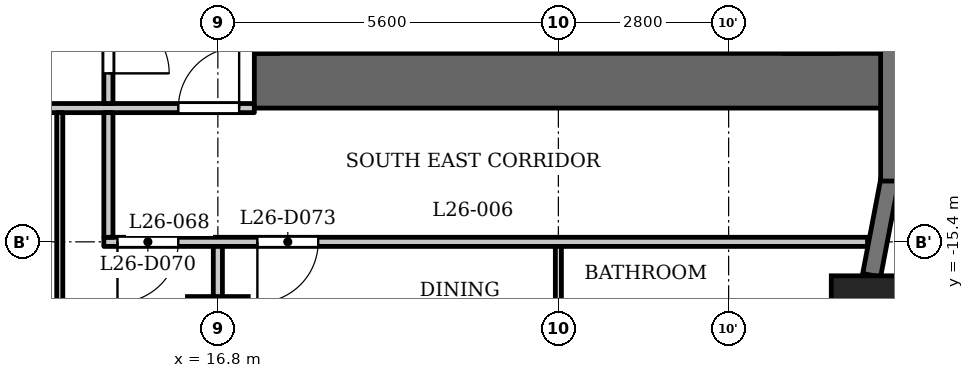
"""IFC4 building model, lengths in metres.
Left out: names, types, materials, properties, quantities, classifications, styles, units other than length and angle.
Written with IfcOpenShell. Run it as: python <this file> out.ifc"""

import sys

from ifc_helpers import new_model, si_unit, direction, frame, frame_2d, origin, origin_2d, place, context, subcontext, project, spatial, rectangle, extrude, element, fill, save


model = new_model("IFC4")
c1 = context("Model", 3, precision=1e-05, world=origin(), true_north=direction((0.0, 1.0)))
c2 = subcontext(c1, "Body", "Model", "MODEL_VIEW")
j1 = project(units=[si_unit("LENGTHUNIT", "METRE"), si_unit("PLANEANGLEUNIT", "RADIAN")], contexts=[c1])
p1 = place(None, origin())
s1 = spatial("IfcSite", under=j1, at=p1, CompositionType="ELEMENT")
p2 = place(p1, origin())
s2 = spatial("IfcBuilding", under=s1, at=p2, CompositionType="ELEMENT")
p3 = place(p2, frame((0.0, 0.0, 104.3)))
s3 = spatial("IfcBuildingStorey", under=s2, at=p3, CompositionType="ELEMENT", Elevation=104.3)
p4 = place(p3, frame((27.538, -16.609, 0.0), z_axis=(0.0, 0.0, 1.0), x_axis=(1.0, 0.0, 0.0)))
e1 = element("IfcColumn", 1, at=p4, inside=s3, PredefinedType="COLUMN", context=c2, shape_type="SweptSolid", body=[
    extrude(rectangle(XDim=1.3, YDim=1.3, at=origin_2d()), origin(), (0.0, 0.0, 1.0), 3.5),
])
p5 = place(p3, frame((16.8, -16.8, 0.0), z_axis=(0.0, 0.0, 1.0), x_axis=(1.0, 0.0, 0.0)))
e2 = element("IfcColumn", 2, at=p5, inside=s3, PredefinedType="COLUMN", context=c2, shape_type="SweptSolid", body=[
    extrude(rectangle(XDim=1.0, YDim=1.0, at=origin_2d()), origin(), (0.0, 0.0, 1.0), 3.5),
])
p6 = place(p3, frame((27.552, -15.949, 0.0), z_axis=(0.0, 0.0, 1.0), x_axis=(0.187279751651, 0.982306619453, 0.0)))
e3 = element("IfcWall", 3, at=p6, inside=s3, PredefinedType="SOLIDWALL", context=c2, shape_type="SweptSolid", body=[
    extrude(rectangle(XDim=1.606, YDim=0.3, at=frame_2d((0.803, 0.0))), origin(), (0.0, 0.0, 1.0), 2.4),
])
p7 = place(p3, frame((27.85, -14.4, 0.0), z_axis=(0.0, 0.0, 1.0), x_axis=(0.0, 1.0, 0.0)))
e4 = element("IfcWall", 4, at=p7, inside=s3, PredefinedType="SOLIDWALL", context=c2, shape_type="SweptSolid", body=[
    extrude(rectangle(XDim=2.55, YDim=0.3, at=frame_2d((1.275, 0.0))), origin(), (0.0, 0.0, 1.0), 2.4),
])
p8 = place(p3, frame((17.4, -12.75, 0.0), z_axis=(0.0, 0.0, 1.0), x_axis=(1.0, 0.0, 0.0)))
e5 = element("IfcWall", 5, at=p8, inside=s3, PredefinedType="SHEAR", context=c2, shape_type="SweptSolid", body=[
    extrude(rectangle(XDim=10.4, YDim=0.9, at=frame_2d((5.2, 0.0))), origin(), (0.0, 0.0, 1.0), 3.2),
])
p9 = place(p3, frame((17.6, -12.3, 0.0), z_axis=(0.0, 0.0, 1.0), x_axis=(0.0, 1.0, 0.0)))
e6 = element("IfcWall", 6, at=p9, inside=s3, PredefinedType="SHEAR", context=c2, shape_type="SweptSolid", body=[
    extrude(rectangle(XDim=24.6, YDim=0.4, at=frame_2d((12.3, 0.0))), origin(), (0.0, 0.0, 1.0), 3.2),
])
p10 = place(p9, frame((6.0, 0.0, 0.0)))
e7 = element("IfcOpeningElement", 7, at=p10, cuts=e6, PredefinedType="OPENING", context=c2, shape_type="SweptSolid", body=[
    extrude(rectangle(XDim=1.1, YDim=2.1, at=frame_2d((0.55, 1.05))), frame((0.0, 0.21, 0.0), z_axis=(0.0, -1.0, 0.0), x_axis=(1.0, 0.0, 0.0)), (0.0, 0.0, 1.0), 0.42),
])
p11 = place(p9, frame((8.4, 0.0, 0.0)))
e8 = element("IfcOpeningElement", 8, at=p11, cuts=e6, PredefinedType="OPENING", context=c2, shape_type="SweptSolid", body=[
    extrude(rectangle(XDim=1.1, YDim=2.1, at=frame_2d((0.55, 1.05))), frame((0.0, 0.21, 0.0), z_axis=(0.0, -1.0, 0.0), x_axis=(1.0, 0.0, 0.0)), (0.0, 0.0, 1.0), 0.42),
])
p12 = place(p9, frame((10.8, 0.0, 0.0)))
e9 = element("IfcOpeningElement", 9, at=p12, cuts=e6, PredefinedType="OPENING", context=c2, shape_type="SweptSolid", body=[
    extrude(rectangle(XDim=1.1, YDim=2.1, at=frame_2d((0.55, 1.05))), frame((0.0, 0.21, 0.0), z_axis=(0.0, -1.0, 0.0), x_axis=(1.0, 0.0, 0.0)), (0.0, 0.0, 1.0), 0.42),
])
p13 = place(p9, frame((16.75, 0.0, 0.0)))
e10 = element("IfcOpeningElement", 10, at=p13, cuts=e6, PredefinedType="OPENING", context=c2, shape_type="SweptSolid", body=[
    extrude(rectangle(XDim=0.9, YDim=2.1, at=frame_2d((0.45, 1.05))), frame((0.0, 0.21, 0.0), z_axis=(0.0, -1.0, 0.0), x_axis=(1.0, 0.0, 0.0)), (0.0, 0.0, 1.0), 0.42),
])
p14 = place(p9, frame((22.8, 0.0, 0.0)))
e11 = element("IfcOpeningElement", 11, at=p14, cuts=e6, PredefinedType="OPENING", context=c2, shape_type="SweptSolid", body=[
    extrude(rectangle(XDim=1.1, YDim=2.1, at=frame_2d((0.55, 1.05))), frame((0.0, 0.21, 0.0), z_axis=(0.0, -1.0, 0.0), x_axis=(1.0, 0.0, 0.0)), (0.0, 0.0, 1.0), 0.42),
])
p15 = place(p9, frame((0.7, 0.0, 0.0)))
e12 = element("IfcOpeningElement", 12, at=p15, cuts=e6, PredefinedType="OPENING", context=c2, shape_type="SweptSolid", body=[
    extrude(rectangle(XDim=1.1, YDim=2.1, at=frame_2d((0.55, 1.05))), frame((0.0, 0.21, 0.0), z_axis=(0.0, -1.0, 0.0), x_axis=(1.0, 0.0, 0.0)), (0.0, 0.0, 1.0), 0.42),
])
p16 = place(p9, frame((12.775, 0.0, 0.0)))
e13 = element("IfcOpeningElement", 13, at=p16, cuts=e6, PredefinedType="OPENING", context=c2, shape_type="SweptSolid", body=[
    extrude(rectangle(XDim=1.8, YDim=2.1, at=frame_2d((0.9, 1.05))), frame((0.0, 0.21, 0.0), z_axis=(0.0, -1.0, 0.0), x_axis=(1.0, 0.0, 0.0)), (0.0, 0.0, 1.0), 0.42),
])
p17 = place(p3, frame((26.55, -12.3, 0.0), z_axis=(0.0, 0.0, 1.0), x_axis=(0.0, 1.0, 0.0)))
e14 = element("IfcWall", 14, at=p17, inside=s3, PredefinedType="SHEAR", context=c2, shape_type="SweptSolid", body=[
    extrude(rectangle(XDim=24.6, YDim=0.9, at=frame_2d((12.3, 0.0))), origin(), (0.0, 0.0, 1.0), 3.2),
])
p18 = place(p3, frame((23.55, -12.3, 0.0), z_axis=(0.0, 0.0, 1.0), x_axis=(0.0, 1.0, 0.0)))
e15 = element("IfcWall", 15, at=p18, inside=s3, PredefinedType="PARTITIONING", context=c2, shape_type="SweptSolid", body=[
    extrude(rectangle(XDim=2.5, YDim=0.2, at=frame_2d((1.25, 0.0))), origin(), (0.0, 0.0, 1.0), 3.2),
])
p19 = place(p18, frame((0.8, 0.0, 0.0)))
e16 = element("IfcOpeningElement", 16, at=p19, cuts=e15, PredefinedType="OPENING", context=c2, shape_type="SweptSolid", body=[
    extrude(rectangle(XDim=0.9, YDim=2.1, at=frame_2d((0.45, 1.05))), frame((0.0, 0.11, 0.0), z_axis=(0.0, -1.0, 0.0), x_axis=(1.0, 0.0, 0.0)), (0.0, 0.0, 1.0), 0.22),
])
p20 = place(p3, frame((14.925, -15.4, 0.0), z_axis=(0.0, 0.0, 1.0), x_axis=(1.0, 0.0, 0.0)))
e17 = element("IfcWall", 17, at=p20, inside=s3, PredefinedType="PARTITIONING", context=c2, shape_type="SweptSolid", body=[
    extrude(rectangle(XDim=12.559, YDim=0.15, at=frame_2d((6.279, 0.0))), origin(), (0.0, 0.0, 1.0), 3.2),
])
p21 = place(p20, frame((0.224, 0.0, 0.0)))
e18 = element("IfcOpeningElement", 18, at=p21, cuts=e17, PredefinedType="OPENING", context=c2, shape_type="SweptSolid", body=[
    extrude(rectangle(XDim=1.0, YDim=2.1, at=frame_2d((0.5, 1.05))), frame((0.0, 0.085, 0.0), z_axis=(0.0, -1.0, 0.0), x_axis=(1.0, 0.0, 0.0)), (0.0, 0.0, 1.0), 0.17),
])
p22 = place(p20, frame((2.525, 0.0, 0.0)))
e19 = element("IfcOpeningElement", 19, at=p22, cuts=e17, PredefinedType="OPENING", context=c2, shape_type="SweptSolid", body=[
    extrude(rectangle(XDim=1.0, YDim=2.1, at=frame_2d((0.5, 1.05))), frame((0.0, 0.085, 0.0), z_axis=(0.0, -1.0, 0.0), x_axis=(1.0, 0.0, 0.0)), (0.0, 0.0, 1.0), 0.17),
])
p23 = place(p3, frame((-17.4, -13.2, 0.0), z_axis=(0.0, 0.0, 1.0), x_axis=(1.0, 0.0, 0.0)))
e20 = element("IfcWall", 20, at=p23, inside=s3, PredefinedType="PARTITIONING", context=c2, shape_type="SweptSolid", body=[
    extrude(rectangle(XDim=34.8, YDim=0.15, at=frame_2d((17.4, 0.0))), origin(), (0.0, 0.0, 1.0), 3.2),
])
p24 = place(p23, frame((0.15, 0.0, 0.0)))
e21 = element("IfcOpeningElement", 21, at=p24, cuts=e20, PredefinedType="OPENING", context=c2, shape_type="SweptSolid", body=[
    extrude(rectangle(XDim=1.0, YDim=2.1, at=frame_2d((0.5, 1.05))), frame((0.0, 0.085, 0.0), z_axis=(0.0, -1.0, 0.0), x_axis=(1.0, 0.0, 0.0)), (0.0, 0.0, 1.0), 0.17),
])
p25 = place(p23, frame((33.55, 0.0, 0.0)))
e22 = element("IfcOpeningElement", 22, at=p25, cuts=e20, PredefinedType="OPENING", context=c2, shape_type="SweptSolid", body=[
    extrude(rectangle(XDim=1.0, YDim=2.1, at=frame_2d((0.5, 1.05))), frame((0.0, 0.085, 0.0), z_axis=(0.0, -1.0, 0.0), x_axis=(1.0, 0.0, 0.0)), (0.0, 0.0, 1.0), 0.17),
])
p26 = place(p23, frame((8.1, 0.0, 0.0)))
e23 = element("IfcOpeningElement", 23, at=p26, cuts=e20, PredefinedType="OPENING", context=c2, shape_type="SweptSolid", body=[
    extrude(rectangle(XDim=1.0, YDim=2.1, at=frame_2d((0.5, 1.05))), frame((0.0, 0.085, 0.0), z_axis=(0.0, -1.0, 0.0), x_axis=(1.0, 0.0, 0.0)), (0.0, 0.0, 1.0), 0.17),
])
p27 = place(p23, frame((12.45, 0.0, 0.0)))
e24 = element("IfcOpeningElement", 24, at=p27, cuts=e20, PredefinedType="OPENING", context=c2, shape_type="SweptSolid", body=[
    extrude(rectangle(XDim=1.0, YDim=2.1, at=frame_2d((0.5, 1.05))), frame((0.0, 0.085, 0.0), z_axis=(0.0, -1.0, 0.0), x_axis=(1.0, 0.0, 0.0)), (0.0, 0.0, 1.0), 0.17),
])
p28 = place(p23, frame((19.05, 0.0, 0.0)))
e25 = element("IfcOpeningElement", 25, at=p28, cuts=e20, PredefinedType="OPENING", context=c2, shape_type="SweptSolid", body=[
    extrude(rectangle(XDim=1.0, YDim=2.1, at=frame_2d((0.5, 1.05))), frame((0.0, 0.085, 0.0), z_axis=(0.0, -1.0, 0.0), x_axis=(1.0, 0.0, 0.0)), (0.0, 0.0, 1.0), 0.17),
])
p29 = place(p23, frame((24.9, 0.0, 0.0)))
e26 = element("IfcOpeningElement", 26, at=p29, cuts=e20, PredefinedType="OPENING", context=c2, shape_type="SweptSolid", body=[
    extrude(rectangle(XDim=1.0, YDim=2.1, at=frame_2d((0.5, 1.05))), frame((0.0, 0.085, 0.0), z_axis=(0.0, -1.0, 0.0), x_axis=(1.0, 0.0, 0.0)), (0.0, 0.0, 1.0), 0.17),
])
p30 = place(p3, frame((14.2, -16.45, 0.0), z_axis=(0.0, 0.0, 1.0), x_axis=(0.0, 1.0, 0.0)))
e27 = element("IfcWall", 27, at=p30, inside=s3, PredefinedType="PARTITIONING", context=c2, shape_type="SweptSolid", body=[
    extrude(rectangle(XDim=3.175, YDim=0.1, at=frame_2d((1.587, 0.0))), origin(), (0.0, 0.0, 1.0), 3.2),
])
p31 = place(p3, frame((15.0, -15.325, 0.0), z_axis=(0.0, 0.0, 1.0), x_axis=(0.0, 1.0, 0.0)))
e28 = element("IfcWall", 28, at=p31, inside=s3, PredefinedType="PARTITIONING", context=c2, shape_type="SweptSolid", body=[
    extrude(rectangle(XDim=2.05, YDim=0.15, at=frame_2d((1.025, 0.0))), origin(), (0.0, 0.0, 1.0), 3.2),
])
p32 = place(p3, frame((15.0, -13.125, 0.0), z_axis=(0.0, 0.0, 1.0), x_axis=(0.0, 1.0, 0.0)))
e29 = element("IfcWall", 29, at=p32, inside=s3, PredefinedType="PARTITIONING", context=c2, shape_type="SweptSolid", body=[
    extrude(rectangle(XDim=6.356, YDim=0.15, at=frame_2d((3.178, 0.0))), origin(), (0.0, 0.0, 1.0), 3.2),
])
p33 = place(p32, frame((0.496, 0.0, 0.0)))
e30 = element("IfcOpeningElement", 30, at=p33, cuts=e29, PredefinedType="OPENING", context=c2, shape_type="SweptSolid", body=[
    extrude(rectangle(XDim=1.0, YDim=2.1, at=frame_2d((0.5, 1.05))), frame((0.0, 0.085, 0.0), z_axis=(0.0, -1.0, 0.0), x_axis=(1.0, 0.0, 0.0)), (0.0, 0.0, 1.0), 0.17),
])
p34 = place(p3, frame((16.8, -23.03, 0.0), z_axis=(0.0, 0.0, 1.0), x_axis=(0.0, 1.0, 0.0)))
e31 = element("IfcWall", 31, at=p34, inside=s3, PredefinedType="PARTITIONING", context=c2, shape_type="SweptSolid", body=[
    extrude(rectangle(XDim=7.555, YDim=0.15, at=frame_2d((3.777, 0.0))), origin(), (0.0, 0.0, 1.0), 3.2),
])
p35 = place(p3, frame((22.4, -17.75, 0.0), z_axis=(0.0, 0.0, 1.0), x_axis=(0.0, 1.0, 0.0)))
e32 = element("IfcWall", 32, at=p35, inside=s3, PredefinedType="PARTITIONING", context=c2, shape_type="SweptSolid", body=[
    extrude(rectangle(XDim=2.275, YDim=0.1, at=frame_2d((1.137, 0.0))), origin(), (0.0, 0.0, 1.0), 3.2),
])
p36 = place(p33, origin())
e33 = element("IfcDoor", 33, at=p36, inside=s3, OperationType="SINGLE_SWING_LEFT", PredefinedType="DOOR", context=c2, shape_type="SweptSolid", body=[
    extrude(rectangle(XDim=1.0, YDim=2.1, at=frame_2d((0.5, 1.05))), frame((0.0, 0.025, 0.0), z_axis=(0.0, -1.0, 0.0), x_axis=(1.0, 0.0, 0.0)), (0.0, 0.0, 1.0), 0.05),
])
fill(e30, e33)
p37 = place(p25, origin())
e34 = element("IfcDoor", 34, at=p37, inside=s3, OperationType="SINGLE_SWING_LEFT", PredefinedType="DOOR", context=c2, shape_type="SweptSolid", body=[
    extrude(rectangle(XDim=1.0, YDim=2.1, at=frame_2d((0.5, 1.05))), frame((0.0, 0.025, 0.0), z_axis=(0.0, -1.0, 0.0), x_axis=(1.0, 0.0, 0.0)), (0.0, 0.0, 1.0), 0.05),
])
fill(e22, e34)
p38 = place(p21, origin())
e35 = element("IfcDoor", 35, at=p38, inside=s3, OperationType="SINGLE_SWING_LEFT", PredefinedType="DOOR", context=c2, shape_type="SweptSolid", body=[
    extrude(rectangle(XDim=1.0, YDim=2.1, at=frame_2d((0.5, 1.05))), frame((0.0, 0.025, 0.0), z_axis=(0.0, -1.0, 0.0), x_axis=(1.0, 0.0, 0.0)), (0.0, 0.0, 1.0), 0.05),
])
fill(e18, e35)
p39 = place(p22, origin())
e36 = element("IfcDoor", 36, at=p39, inside=s3, OperationType="SINGLE_SWING_LEFT", PredefinedType="DOOR", context=c2, shape_type="SweptSolid", body=[
    extrude(rectangle(XDim=1.0, YDim=2.1, at=frame_2d((0.5, 1.05))), frame((0.0, 0.025, 0.0), z_axis=(0.0, -1.0, 0.0), x_axis=(1.0, 0.0, 0.0)), (0.0, 0.0, 1.0), 0.05),
])
fill(e19, e36)
save(model, sys.argv[1])
